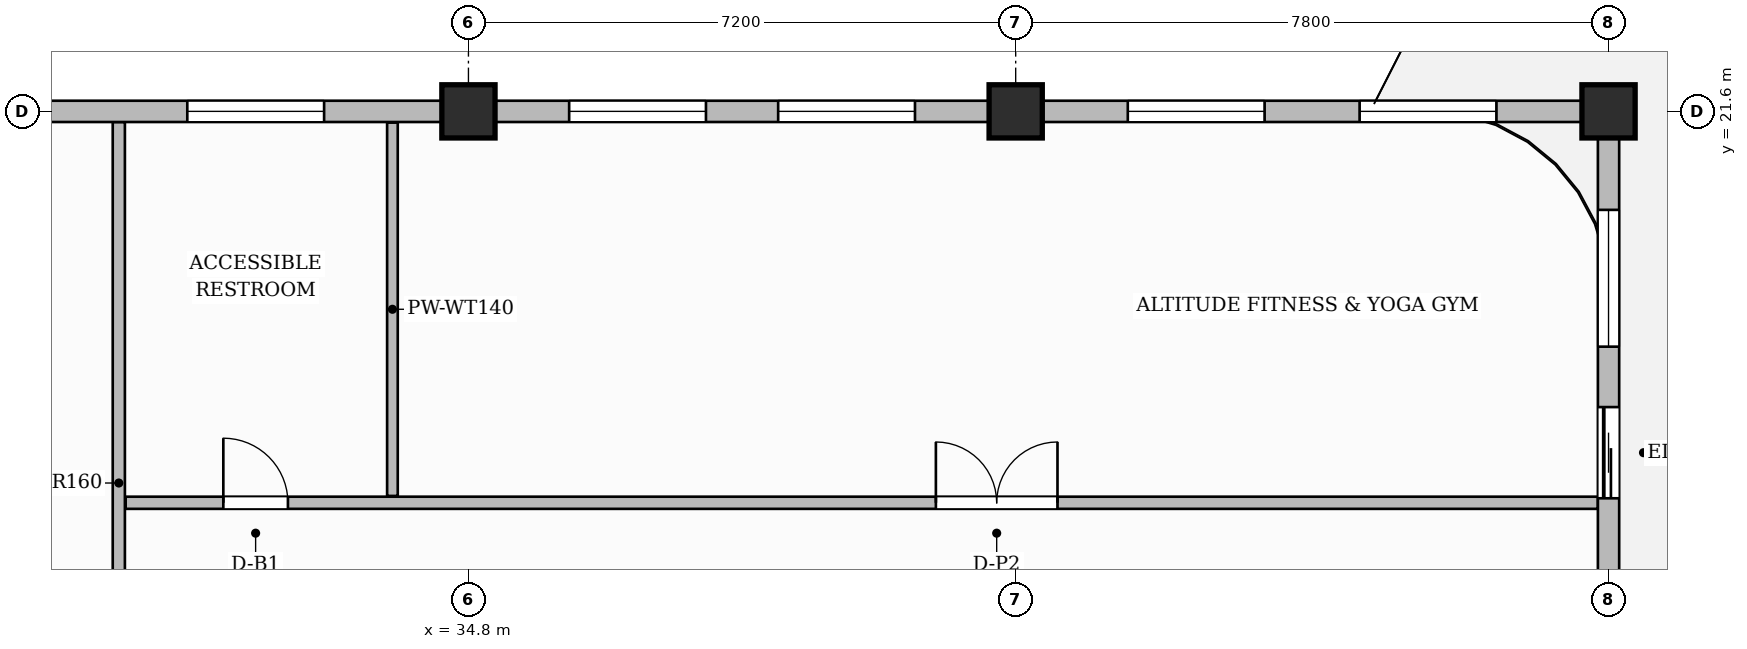
"""IFC4 building model, lengths in metres.
Left out: names, types, materials, properties, quantities, classifications, styles, units other than length and angle.
Written with IfcOpenShell. Run it as: python <this file> out.ifc"""

import sys

from ifc_helpers import new_model, si_unit, direction, frame, frame_2d, origin, origin_2d, place, context, subcontext, project, spatial, rectangle, extrude, source, transform, mapped, element, fill, save


model = new_model("IFC4")
c1 = context("Model", 3, precision=1e-05, world=origin(), true_north=direction((0.0, 1.0)))
c2 = subcontext(c1, "Body", "Model", "MODEL_VIEW")
j1 = project(units=[si_unit("LENGTHUNIT", "METRE"), si_unit("PLANEANGLEUNIT", "RADIAN")], contexts=[c1])
p1 = place(None, origin())
s1 = spatial("IfcSite", under=j1, at=p1, CompositionType="ELEMENT")
p2 = place(p1, origin())
s2 = spatial("IfcBuilding", under=s1, at=p2, CompositionType="ELEMENT")
p3 = place(p2, frame((0.0, 0.0, 275.05)))
s3 = spatial("IfcBuildingStorey", under=s2, at=p3, CompositionType="ELEMENT", Elevation=275.05)
m1 = source(origin(), c2, "Body", "SweptSolid", [
    extrude(rectangle(XDim=0.7, YDim=0.7, at=origin_2d()), origin(), (0.0, 0.0, 1.0), 3.85),
])
for number, where, z_axis, x_axis in (
    (1, (34.8, 21.6, 0.0), (0.0, 0.0, 1.0), (1.0, 0.0, 0.0)),
    (2, (42.0, 21.6, 0.0), (0.0, 0.0, 1.0), (1.0, 0.0, 0.0)),
    (3, (49.8, 21.6, 0.0), (0.0, 0.0, 1.0), (1.0, 0.0, 0.0)),
):
    element("IfcColumn", number, at=place(p3, frame(where, z_axis=z_axis, x_axis=x_axis)), inside=s3, PredefinedType="COLUMN", context=c2, shape_type="MappedRepresentation", body=[
        mapped(m1, transform((0.0, 0.0, 0.0), scale=1.0)),
    ])
p4 = place(p3, frame((30.2, 11.96, 0.0), z_axis=(0.0, 0.0, 1.0), x_axis=(0.0, 1.0, 0.0)))
e4 = element("IfcWall", 4, at=p4, inside=s3, PredefinedType="PARTITIONING", context=c2, shape_type="SweptSolid", body=[
    extrude(rectangle(XDim=9.5, YDim=0.16, at=frame_2d((4.75, 0.0))), origin(), (0.0, 0.0, 1.0), 3.6),
])
p5 = place(p3, frame((30.29, 16.45, 0.0), z_axis=(0.0, 0.0, 1.0), x_axis=(1.0, 0.0, 0.0)))
e5 = element("IfcWall", 5, at=p5, inside=s3, PredefinedType="PARTITIONING", context=c2, shape_type="SweptSolid", body=[
    extrude(rectangle(XDim=19.37, YDim=0.16, at=frame_2d((9.685, 0.0))), origin(), (0.0, 0.0, 1.0), 3.6),
])
p6 = place(p5, frame((1.285, 0.0, 0.0)))
e6 = element("IfcOpeningElement", 6, at=p6, cuts=e5, PredefinedType="OPENING", context=c2, shape_type="SweptSolid", body=[
    extrude(rectangle(XDim=0.85, YDim=2.1, at=frame_2d((0.425, 1.05))), frame((0.0, 0.09, 0.0), z_axis=(0.0, -1.0, 0.0), x_axis=(1.0, 0.0, 0.0)), (0.0, 0.0, 1.0), 0.18),
])
p7 = place(p5, frame((10.66, 0.0, 0.0)))
e7 = element("IfcOpeningElement", 7, at=p7, cuts=e5, PredefinedType="OPENING", context=c2, shape_type="SweptSolid", body=[
    extrude(rectangle(XDim=1.6, YDim=2.4, at=frame_2d((0.8, 1.2))), frame((0.0, 0.09, 0.0), z_axis=(0.0, -1.0, 0.0), x_axis=(1.0, 0.0, 0.0)), (0.0, 0.0, 1.0), 0.18),
])
p8 = place(p3, frame((33.8, 16.54, 0.0), z_axis=(0.0, 0.0, 1.0), x_axis=(0.0, 1.0, 0.0)))
e8 = element("IfcWall", 8, at=p8, inside=s3, PredefinedType="PARTITIONING", context=c2, shape_type="SweptSolid", body=[
    extrude(rectangle(XDim=4.912, YDim=0.14, at=frame_2d((2.456, 0.0))), origin(), (0.0, 0.0, 1.0), 3.6),
])
p9 = place(p3, frame((49.8, 14.62, 0.0), z_axis=(0.0, 0.0, 1.0), x_axis=(0.0, 1.0, 0.0)))
e9 = element("IfcWall", 9, at=p9, inside=s3, PredefinedType="SOLIDWALL", context=c2, shape_type="SweptSolid", body=[
    extrude(rectangle(XDim=6.93, YDim=0.28, at=frame_2d((3.465, 0.0))), origin(), (0.0, 0.0, 1.0), 3.185),
])
p10 = place(p9, frame((1.889, 0.0, 0.0)))
e10 = element("IfcOpeningElement", 10, at=p10, cuts=e9, PredefinedType="OPENING", context=c2, shape_type="SweptSolid", body=[
    extrude(rectangle(XDim=1.2, YDim=2.2, at=frame_2d((0.6, 1.1))), frame((0.0, 0.15, 0.0), z_axis=(0.0, -1.0, 0.0), x_axis=(1.0, 0.0, 0.0)), (0.0, 0.0, 1.0), 0.3),
])
p11 = place(p9, frame((3.884, 0.0, 0.8)))
e11 = element("IfcOpeningElement", 11, at=p11, cuts=e9, PredefinedType="OPENING", context=c2, shape_type="SweptSolid", body=[
    extrude(rectangle(XDim=1.8, YDim=1.85, at=frame_2d((0.9, 0.925))), frame((0.0, 0.15, 0.0), z_axis=(0.0, -1.0, 0.0), x_axis=(1.0, 0.0, 0.0)), (0.0, 0.0, 1.0), 0.3),
])
p12 = place(p3, frame((18.0, 21.6, 0.0), z_axis=(0.0, 0.0, 1.0), x_axis=(1.0, 0.0, 0.0)))
e12 = element("IfcWall", 12, at=p12, inside=s3, PredefinedType="SOLIDWALL", context=c2, shape_type="SweptSolid", body=[
    extrude(rectangle(XDim=31.8, YDim=0.28, at=frame_2d((15.9, 0.0))), origin(), (0.0, 0.0, 1.0), 3.185),
])
p13 = place(p12, frame((0.42, 0.0, 0.0)))
e13 = element("IfcOpeningElement", 13, at=p13, cuts=e12, PredefinedType="OPENING", context=c2, shape_type="SweptSolid", body=[
    extrude(rectangle(XDim=1.2, YDim=2.2, at=frame_2d((0.6, 1.1))), frame((0.0, 0.15, 0.0), z_axis=(0.0, -1.0, 0.0), x_axis=(1.0, 0.0, 0.0)), (0.0, 0.0, 1.0), 0.3),
])
p14 = place(p12, frame((4.896, 0.0, 0.8)))
e14 = element("IfcOpeningElement", 14, at=p14, cuts=e12, PredefinedType="OPENING", context=c2, shape_type="SweptSolid", body=[
    extrude(rectangle(XDim=1.4, YDim=1.85, at=frame_2d((0.7, 0.925))), frame((0.0, 0.15, 0.0), z_axis=(0.0, -1.0, 0.0), x_axis=(1.0, 0.0, 0.0)), (0.0, 0.0, 1.0), 0.3),
])
p15 = place(p12, frame((7.504, 0.0, 0.8)))
e15 = element("IfcOpeningElement", 15, at=p15, cuts=e12, PredefinedType="OPENING", context=c2, shape_type="SweptSolid", body=[
    extrude(rectangle(XDim=1.8, YDim=1.85, at=frame_2d((0.9, 0.925))), frame((0.0, 0.15, 0.0), z_axis=(0.0, -1.0, 0.0), x_axis=(1.0, 0.0, 0.0)), (0.0, 0.0, 1.0), 0.3),
])
p16 = place(p12, frame((13.101, 0.0, 0.8)))
e16 = element("IfcOpeningElement", 16, at=p16, cuts=e12, PredefinedType="OPENING", context=c2, shape_type="SweptSolid", body=[
    extrude(rectangle(XDim=1.8, YDim=1.85, at=frame_2d((0.9, 0.925))), frame((0.0, 0.15, 0.0), z_axis=(0.0, -1.0, 0.0), x_axis=(1.0, 0.0, 0.0)), (0.0, 0.0, 1.0), 0.3),
])
p17 = place(p12, frame((18.125, 0.0, 0.8)))
e17 = element("IfcOpeningElement", 17, at=p17, cuts=e12, PredefinedType="OPENING", context=c2, shape_type="SweptSolid", body=[
    extrude(rectangle(XDim=1.8, YDim=1.85, at=frame_2d((0.9, 0.925))), frame((0.0, 0.15, 0.0), z_axis=(0.0, -1.0, 0.0), x_axis=(1.0, 0.0, 0.0)), (0.0, 0.0, 1.0), 0.3),
])
p18 = place(p12, frame((20.875, 0.0, 0.8)))
e18 = element("IfcOpeningElement", 18, at=p18, cuts=e12, PredefinedType="OPENING", context=c2, shape_type="SweptSolid", body=[
    extrude(rectangle(XDim=1.8, YDim=1.85, at=frame_2d((0.9, 0.925))), frame((0.0, 0.15, 0.0), z_axis=(0.0, -1.0, 0.0), x_axis=(1.0, 0.0, 0.0)), (0.0, 0.0, 1.0), 0.3),
])
p19 = place(p12, frame((25.475, 0.0, 0.8)))
e19 = element("IfcOpeningElement", 19, at=p19, cuts=e12, PredefinedType="OPENING", context=c2, shape_type="SweptSolid", body=[
    extrude(rectangle(XDim=1.8, YDim=1.85, at=frame_2d((0.9, 0.925))), frame((0.0, 0.15, 0.0), z_axis=(0.0, -1.0, 0.0), x_axis=(1.0, 0.0, 0.0)), (0.0, 0.0, 1.0), 0.3),
])
p20 = place(p12, frame((28.525, 0.0, 0.8)))
e20 = element("IfcOpeningElement", 20, at=p20, cuts=e12, PredefinedType="OPENING", context=c2, shape_type="SweptSolid", body=[
    extrude(rectangle(XDim=1.8, YDim=1.85, at=frame_2d((0.9, 0.925))), frame((0.0, 0.15, 0.0), z_axis=(0.0, -1.0, 0.0), x_axis=(1.0, 0.0, 0.0)), (0.0, 0.0, 1.0), 0.3),
])
m2 = source(origin(), c2, "Body", "SweptSolid", [
    extrude(rectangle(XDim=0.85, YDim=2.1, at=frame_2d((0.425, 1.05))), frame((0.0, 0.025, 0.0), z_axis=(0.0, -1.0, 0.0), x_axis=(1.0, 0.0, 0.0)), (0.0, 0.0, 1.0), 0.05),
])
p21 = place(p6, origin())
e21 = element("IfcDoor", 21, at=p21, inside=s3, OperationType="SINGLE_SWING_LEFT", PredefinedType="DOOR", context=c2, shape_type="MappedRepresentation", body=[
    mapped(m2, transform((0.0, 0.0, 0.0), scale=1.0)),
])
fill(e6, e21)
m3 = source(origin(), c2, "Body", "SweptSolid", [
    extrude(rectangle(XDim=1.6, YDim=2.4, at=frame_2d((0.8, 1.2))), frame((0.0, 0.025, 0.0), z_axis=(0.0, -1.0, 0.0), x_axis=(1.0, 0.0, 0.0)), (0.0, 0.0, 1.0), 0.05),
])
p22 = place(p7, origin())
e22 = element("IfcDoor", 22, at=p22, inside=s3, OperationType="DOUBLE_DOOR_SINGLE_SWING", PredefinedType="DOOR", context=c2, shape_type="MappedRepresentation", body=[
    mapped(m3, transform((0.0, 0.0, 0.0), scale=1.0)),
])
fill(e7, e22)
m4 = source(origin(), c2, "Body", "SweptSolid", [
    extrude(rectangle(XDim=1.2, YDim=2.2, at=frame_2d((0.6, 1.1))), frame((0.0, 0.025, 0.0), z_axis=(0.0, -1.0, 0.0), x_axis=(1.0, 0.0, 0.0)), (0.0, 0.0, 1.0), 0.05),
])
p23 = place(p10, origin())
e23 = element("IfcDoor", 23, at=p23, inside=s3, OperationType="SLIDING_TO_LEFT", PredefinedType="DOOR", context=c2, shape_type="MappedRepresentation", body=[
    mapped(m4, transform((0.0, 0.0, 0.0), scale=1.0)),
])
fill(e10, e23)
m5 = source(origin(), c2, "Body", "SweptSolid", [
    extrude(rectangle(XDim=1.8, YDim=1.85, at=frame_2d((0.9, 0.925))), frame((0.0, 0.03, 0.0), z_axis=(0.0, -1.0, 0.0), x_axis=(1.0, 0.0, 0.0)), (0.0, 0.0, 1.0), 0.06),
])
p24 = place(p11, origin())
e24 = element("IfcWindow", 24, at=p24, inside=s3, PartitioningType="DOUBLE_PANEL_VERTICAL", PredefinedType="WINDOW", context=c2, shape_type="MappedRepresentation", body=[
    mapped(m5, transform((0.0, 0.0, 0.0), scale=1.0)),
])
fill(e11, e24)
p25 = place(p16, origin())
e25 = element("IfcWindow", 25, at=p25, inside=s3, PartitioningType="DOUBLE_PANEL_VERTICAL", PredefinedType="WINDOW", context=c2, shape_type="MappedRepresentation", body=[
    mapped(m5, transform((0.0, 0.0, 0.0), scale=1.0)),
])
fill(e16, e25)
p26 = place(p17, origin())
e26 = element("IfcWindow", 26, at=p26, inside=s3, PartitioningType="DOUBLE_PANEL_VERTICAL", PredefinedType="WINDOW", context=c2, shape_type="MappedRepresentation", body=[
    mapped(m5, transform((0.0, 0.0, 0.0), scale=1.0)),
])
fill(e17, e26)
p27 = place(p18, origin())
e27 = element("IfcWindow", 27, at=p27, inside=s3, PartitioningType="DOUBLE_PANEL_VERTICAL", PredefinedType="WINDOW", context=c2, shape_type="MappedRepresentation", body=[
    mapped(m5, transform((0.0, 0.0, 0.0), scale=1.0)),
])
fill(e18, e27)
p28 = place(p19, origin())
e28 = element("IfcWindow", 28, at=p28, inside=s3, PartitioningType="DOUBLE_PANEL_VERTICAL", PredefinedType="WINDOW", context=c2, shape_type="MappedRepresentation", body=[
    mapped(m5, transform((0.0, 0.0, 0.0), scale=1.0)),
])
fill(e19, e28)
p29 = place(p20, origin())
e29 = element("IfcWindow", 29, at=p29, inside=s3, PartitioningType="DOUBLE_PANEL_VERTICAL", PredefinedType="WINDOW", context=c2, shape_type="MappedRepresentation", body=[
    mapped(m5, transform((0.0, 0.0, 0.0), scale=1.0)),
])
fill(e20, e29)
save(model, sys.argv[1])
